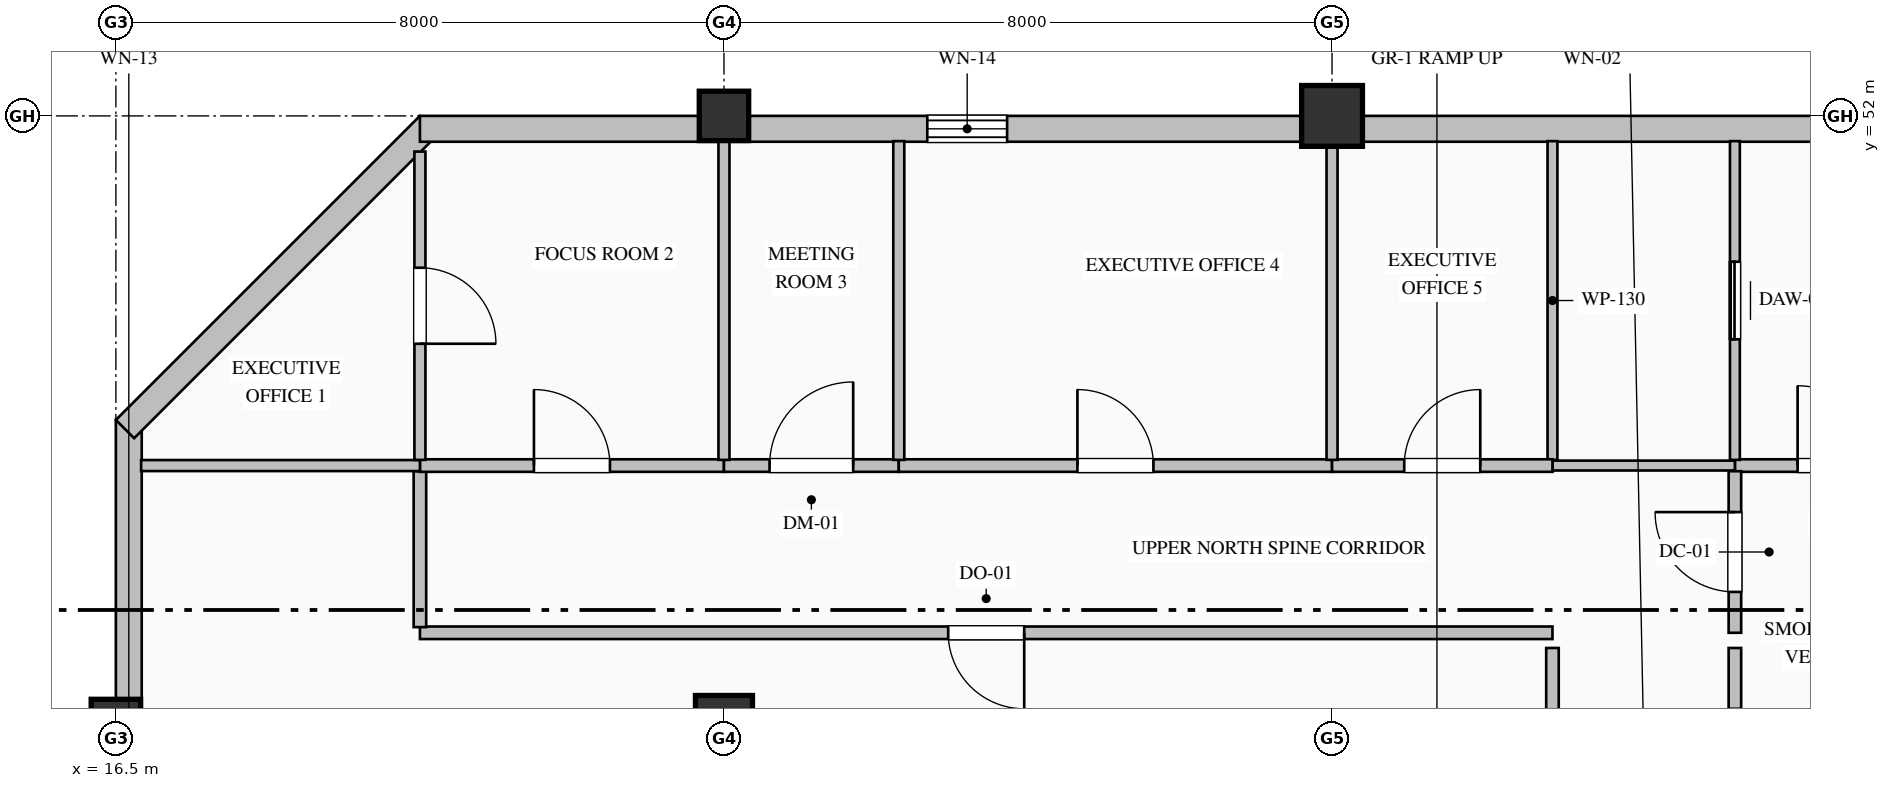
"""IFC4 building model, lengths in metres.
Left out: names, types, materials, properties, quantities, classifications, styles, units other than length and angle.
Written with IfcOpenShell. Run it as: python <this file> out.ifc"""

import sys

from ifc_helpers import new_model, si_unit, direction, frame, frame_2d, origin, origin_2d, place, context, subcontext, project, spatial, rectangle, hollow_rectangle, extrude, element, fill, save


model = new_model("IFC4")
c1 = context("Model", 3, precision=1e-05, world=origin(), true_north=direction((0.0, 1.0)))
c2 = subcontext(c1, "Body", "Model", "MODEL_VIEW")
j1 = project(units=[si_unit("LENGTHUNIT", "METRE"), si_unit("PLANEANGLEUNIT", "RADIAN")], contexts=[c1])
p1 = place(None, origin())
s1 = spatial("IfcSite", under=j1, at=p1, CompositionType="ELEMENT")
p2 = place(p1, origin())
s2 = spatial("IfcBuilding", under=s1, at=p2, CompositionType="ELEMENT")
p3 = place(p2, frame((0.0, 0.0, 291.2)))
s3 = spatial("IfcBuildingStorey", under=s2, at=p3, CompositionType="ELEMENT", Elevation=291.2)
p4 = place(p3, frame((16.5, 44.0, 0.0), z_axis=(0.0, 0.0, 1.0), x_axis=(1.0, 0.0, 0.0)))
e1 = element("IfcColumn", 1, at=p4, inside=s3, PredefinedType="COLUMN", context=c2, shape_type="SweptSolid", body=[
    extrude(hollow_rectangle(XDim=0.65, YDim=0.65, WallThickness=0.028, at=origin_2d()), origin(), (0.0, 0.0, 1.0), 4.0),
])
p5 = place(p3, frame((24.5, 44.0, 0.0), z_axis=(0.0, 0.0, 1.0), x_axis=(1.0, 0.0, 0.0)))
e2 = element("IfcColumn", 2, at=p5, inside=s3, PredefinedType="COLUMN", context=c2, shape_type="SweptSolid", body=[
    extrude(rectangle(XDim=0.75, YDim=0.75, at=origin_2d()), origin(), (0.0, 0.0, 1.0), 4.0),
])
p6 = place(p3, frame((24.5, 52.0, 0.0), z_axis=(0.0, 0.0, 1.0), x_axis=(1.0, 0.0, 0.0)))
e3 = element("IfcColumn", 3, at=p6, inside=s3, PredefinedType="COLUMN", context=c2, shape_type="SweptSolid", body=[
    extrude(hollow_rectangle(XDim=0.65, YDim=0.65, WallThickness=0.028, at=origin_2d()), origin(), (0.0, 0.0, 1.0), 4.0),
])
p7 = place(p3, frame((32.5, 52.0, 0.0), z_axis=(0.0, 0.0, 1.0), x_axis=(1.0, 0.0, 0.0)))
e4 = element("IfcColumn", 4, at=p7, inside=s3, PredefinedType="COLUMN", context=c2, shape_type="SweptSolid", body=[
    extrude(hollow_rectangle(XDim=0.8, YDim=0.8, WallThickness=0.032, at=origin_2d()), origin(), (0.0, 0.0, 1.0), 4.0),
])
p8 = place(p3, frame((16.67, 32.0, 0.0), z_axis=(0.0, 0.0, 1.0), x_axis=(0.0, 1.0, 0.0)))
e5 = element("IfcWall", 5, at=p8, inside=s3, PredefinedType="SOLIDWALL", context=c2, shape_type="SweptSolid", body=[
    extrude(rectangle(XDim=16.0, YDim=0.34, at=frame_2d((8.0, 0.0))), origin(), (0.0, 0.0, 1.0), 3.335),
])
p9 = place(p8, frame((6.525, 0.0, 0.9)))
e6 = element("IfcOpeningElement", 6, at=p9, cuts=e5, PredefinedType="OPENING", context=c2, shape_type="SweptSolid", body=[
    extrude(rectangle(XDim=1.35, YDim=1.85, at=frame_2d((0.675, 0.925))), frame((0.0, 0.18, 0.0), z_axis=(0.0, -1.0, 0.0), x_axis=(1.0, 0.0, 0.0)), (0.0, 0.0, 1.0), 0.36),
])
p10 = place(p8, frame((10.325, 0.0, 0.9)))
e7 = element("IfcOpeningElement", 7, at=p10, cuts=e5, PredefinedType="OPENING", context=c2, shape_type="SweptSolid", body=[
    extrude(rectangle(XDim=0.95, YDim=1.85, at=frame_2d((0.475, 0.925))), frame((0.0, 0.18, 0.0), z_axis=(0.0, -1.0, 0.0), x_axis=(1.0, 0.0, 0.0)), (0.0, 0.0, 1.0), 0.36),
])
p11 = place(p3, frame((16.62, 47.88, 0.0), z_axis=(0.0, 0.0, 1.0), x_axis=(0.707106781187, 0.707106781187, 0.0)))
e8 = element("IfcWall", 8, at=p11, inside=s3, PredefinedType="SOLIDWALL", context=c2, shape_type="SweptSolid", body=[
    extrude(rectangle(XDim=5.657, YDim=0.34, at=frame_2d((2.828, 0.0))), origin(), (0.0, 0.0, 1.0), 3.785),
])
p12 = place(p3, frame((20.5, 51.83, 0.0), z_axis=(0.0, 0.0, 1.0), x_axis=(1.0, 0.0, 0.0)))
e9 = element("IfcWall", 9, at=p12, inside=s3, PredefinedType="SOLIDWALL", context=c2, shape_type="SweptSolid", body=[
    extrude(rectangle(XDim=20.02, YDim=0.34, at=frame_2d((10.01, 0.0))), origin(), (0.0, 0.0, 1.0), 3.335),
])
p13 = place(p12, frame((6.675, 0.0, 0.8)))
e10 = element("IfcOpeningElement", 10, at=p13, cuts=e9, PredefinedType="OPENING", context=c2, shape_type="SweptSolid", body=[
    extrude(rectangle(XDim=1.05, YDim=2.15, at=frame_2d((0.525, 1.075))), frame((0.0, 0.18, 0.0), z_axis=(0.0, -1.0, 0.0), x_axis=(1.0, 0.0, 0.0)), (0.0, 0.0, 1.0), 0.36),
])
p14 = place(p3, frame((37.8, 47.4, 0.0), z_axis=(0.0, 0.0, 1.0), x_axis=(1.0, 0.0, 0.0)))
e11 = element("IfcWall", 11, at=p14, inside=s3, PredefinedType="PARTITIONING", context=c2, shape_type="SweptSolid", body=[
    extrude(rectangle(XDim=2.7, YDim=0.165, at=frame_2d((1.35, 0.0))), origin(), (0.0, 0.0, 1.0), 3.785),
])
p15 = place(p14, frame((0.825, 0.0, 0.0)))
e12 = element("IfcOpeningElement", 12, at=p15, cuts=e11, PredefinedType="OPENING", context=c2, shape_type="SweptSolid", body=[
    extrude(rectangle(XDim=1.05, YDim=2.15, at=frame_2d((0.525, 1.075))), frame((0.0, 0.093, 0.0), z_axis=(0.0, -1.0, 0.0), x_axis=(1.0, 0.0, 0.0)), (0.0, 0.0, 1.0), 0.185),
])
p16 = place(p3, frame((37.8, 45.2, 0.0), z_axis=(0.0, 0.0, 1.0), x_axis=(0.0, 1.0, 0.0)))
e13 = element("IfcWall", 13, at=p16, inside=s3, PredefinedType="PARTITIONING", context=c2, shape_type="SweptSolid", body=[
    extrude(rectangle(XDim=2.125, YDim=0.165, at=frame_2d((1.063, 0.0))), origin(), (0.0, 0.0, 1.0), 3.785),
])
p17 = place(p16, frame((0.538, 0.0, 0.0)))
e14 = element("IfcOpeningElement", 14, at=p17, cuts=e13, PredefinedType="OPENING", context=c2, shape_type="SweptSolid", body=[
    extrude(rectangle(XDim=1.05, YDim=2.15, at=frame_2d((0.525, 1.075))), frame((0.0, 0.093, 0.0), z_axis=(0.0, -1.0, 0.0), x_axis=(1.0, 0.0, 0.0)), (0.0, 0.0, 1.0), 0.185),
])
p18 = place(p3, frame((37.8, 44.2, 0.0), z_axis=(0.0, 0.0, 1.0), x_axis=(0.0, 1.0, 0.0)))
e15 = element("IfcWall", 15, at=p18, inside=s3, PredefinedType="PARTITIONING", context=c2, shape_type="SweptSolid", body=[
    extrude(rectangle(XDim=0.8, YDim=0.165, at=frame_2d((0.4, 0.0))), origin(), (0.0, 0.0, 1.0), 3.785),
])
p19 = place(p3, frame((37.8, 47.475, 0.0), z_axis=(0.0, 0.0, 1.0), x_axis=(0.0, 1.0, 0.0)))
e16 = element("IfcWall", 16, at=p19, inside=s3, PredefinedType="PARTITIONING", context=c2, shape_type="SweptSolid", body=[
    extrude(rectangle(XDim=4.193, YDim=0.13, at=frame_2d((2.097, 0.0))), origin(), (0.0, 0.0, 1.0), 3.785),
])
p20 = place(p19, frame((1.587, 0.0, 0.0)))
e17 = element("IfcOpeningElement", 17, at=p20, cuts=e16, PredefinedType="OPENING", context=c2, shape_type="SweptSolid", body=[
    extrude(rectangle(XDim=1.02, YDim=2.15, at=frame_2d((0.51, 1.075))), frame((0.0, 0.075, 0.0), z_axis=(0.0, -1.0, 0.0), x_axis=(1.0, 0.0, 0.0)), (0.0, 0.0, 1.0), 0.15),
])
p21 = place(p3, frame((37.8, 47.4, 0.0), z_axis=(0.0, 0.0, 1.0), x_axis=(-1.0, 0.0, 0.0)))
e18 = element("IfcWall", 18, at=p21, inside=s3, PredefinedType="PARTITIONING", context=c2, shape_type="SweptSolid", body=[
    extrude(rectangle(XDim=2.4, YDim=0.13, at=frame_2d((1.2, 0.0))), origin(), (0.0, 0.0, 1.0), 3.785),
])
p22 = place(p3, frame((35.4, 47.475, 0.0), z_axis=(0.0, 0.0, 1.0), x_axis=(0.0, 1.0, 0.0)))
e19 = element("IfcWall", 19, at=p22, inside=s3, PredefinedType="PARTITIONING", context=c2, shape_type="SweptSolid", body=[
    extrude(rectangle(XDim=4.193, YDim=0.13, at=frame_2d((2.097, 0.0))), origin(), (0.0, 0.0, 1.0), 3.785),
])
p23 = place(p3, frame((35.4, 45.2, 0.0), z_axis=(0.0, 0.0, 1.0), x_axis=(-1.0, 0.0, 0.0)))
e20 = element("IfcWall", 20, at=p23, inside=s3, PredefinedType="PARTITIONING", context=c2, shape_type="SweptSolid", body=[
    extrude(rectangle(XDim=14.9, YDim=0.165, at=frame_2d((7.45, 0.0))), origin(), (0.0, 0.0, 1.0), 3.785),
])
p24 = place(p23, frame((6.95, 0.0, 0.0)))
e21 = element("IfcOpeningElement", 21, at=p24, cuts=e20, PredefinedType="OPENING", context=c2, shape_type="SweptSolid", body=[
    extrude(rectangle(XDim=1.0, YDim=2.15, at=frame_2d((0.5, 1.075))), frame((0.0, 0.093, 0.0), z_axis=(0.0, -1.0, 0.0), x_axis=(1.0, 0.0, 0.0)), (0.0, 0.0, 1.0), 0.185),
])
p25 = place(p3, frame((20.5, 45.274, 0.0), z_axis=(0.0, 0.0, 1.0), x_axis=(0.0, 1.0, 0.0)))
e22 = element("IfcWall", 22, at=p25, inside=s3, PredefinedType="PARTITIONING", context=c2, shape_type="SweptSolid", body=[
    extrude(rectangle(XDim=2.051, YDim=0.165, at=frame_2d((1.025, 0.0))), origin(), (0.0, 0.0, 1.0), 3.785),
])
p26 = place(p3, frame((20.5, 47.4, 0.0), z_axis=(0.0, 0.0, 1.0), x_axis=(1.0, 0.0, 0.0)))
e23 = element("IfcWall", 23, at=p26, inside=s3, PredefinedType="PARTITIONING", context=c2, shape_type="SweptSolid", body=[
    extrude(rectangle(XDim=4.0, YDim=0.165, at=frame_2d((2.0, 0.0))), origin(), (0.0, 0.0, 1.0), 3.785),
])
p27 = place(p26, frame((1.5, 0.0, 0.0)))
e24 = element("IfcOpeningElement", 24, at=p27, cuts=e23, PredefinedType="OPENING", context=c2, shape_type="SweptSolid", body=[
    extrude(rectangle(XDim=1.0, YDim=2.15, at=frame_2d((0.5, 1.075))), frame((0.0, 0.093, 0.0), z_axis=(0.0, -1.0, 0.0), x_axis=(1.0, 0.0, 0.0)), (0.0, 0.0, 1.0), 0.185),
])
p28 = place(p3, frame((24.5, 47.4, 0.0), z_axis=(0.0, 0.0, 1.0), x_axis=(1.0, 0.0, 0.0)))
e25 = element("IfcWall", 25, at=p28, inside=s3, PredefinedType="PARTITIONING", context=c2, shape_type="SweptSolid", body=[
    extrude(rectangle(XDim=2.3, YDim=0.165, at=frame_2d((1.15, 0.0))), origin(), (0.0, 0.0, 1.0), 3.785),
])
p29 = place(p28, frame((0.6, 0.0, 0.0)))
e26 = element("IfcOpeningElement", 26, at=p29, cuts=e25, PredefinedType="OPENING", context=c2, shape_type="SweptSolid", body=[
    extrude(rectangle(XDim=1.1, YDim=2.2, at=frame_2d((0.55, 1.1))), frame((0.0, 0.093, 0.0), z_axis=(0.0, -1.0, 0.0), x_axis=(1.0, 0.0, 0.0)), (0.0, 0.0, 1.0), 0.185),
])
p30 = place(p3, frame((26.8, 47.4, 0.0), z_axis=(0.0, 0.0, 1.0), x_axis=(1.0, 0.0, 0.0)))
e27 = element("IfcWall", 27, at=p30, inside=s3, PredefinedType="PARTITIONING", context=c2, shape_type="SweptSolid", body=[
    extrude(rectangle(XDim=5.7, YDim=0.165, at=frame_2d((2.85, 0.0))), origin(), (0.0, 0.0, 1.0), 3.785),
])
p31 = place(p30, frame((2.35, 0.0, 0.0)))
e28 = element("IfcOpeningElement", 28, at=p31, cuts=e27, PredefinedType="OPENING", context=c2, shape_type="SweptSolid", body=[
    extrude(rectangle(XDim=1.0, YDim=2.15, at=frame_2d((0.5, 1.075))), frame((0.0, 0.093, 0.0), z_axis=(0.0, -1.0, 0.0), x_axis=(1.0, 0.0, 0.0)), (0.0, 0.0, 1.0), 0.185),
])
p32 = place(p3, frame((32.5, 47.4, 0.0), z_axis=(0.0, 0.0, 1.0), x_axis=(1.0, 0.0, 0.0)))
e29 = element("IfcWall", 29, at=p32, inside=s3, PredefinedType="PARTITIONING", context=c2, shape_type="SweptSolid", body=[
    extrude(rectangle(XDim=2.9, YDim=0.165, at=frame_2d((1.45, 0.0))), origin(), (0.0, 0.0, 1.0), 3.785),
])
p33 = place(p32, frame((0.95, 0.0, 0.0)))
e30 = element("IfcOpeningElement", 30, at=p33, cuts=e29, PredefinedType="OPENING", context=c2, shape_type="SweptSolid", body=[
    extrude(rectangle(XDim=1.0, YDim=2.15, at=frame_2d((0.5, 1.075))), frame((0.0, 0.093, 0.0), z_axis=(0.0, -1.0, 0.0), x_axis=(1.0, 0.0, 0.0)), (0.0, 0.0, 1.0), 0.185),
])
p34 = place(p3, frame((35.4, 33.6, 0.0), z_axis=(0.0, 0.0, 1.0), x_axis=(0.0, 1.0, 0.0)))
e31 = element("IfcWall", 31, at=p34, inside=s3, PredefinedType="PARTITIONING", context=c2, shape_type="SweptSolid", body=[
    extrude(rectangle(XDim=11.4, YDim=0.165, at=frame_2d((5.7, 0.0))), origin(), (0.0, 0.0, 1.0), 3.785),
])
p35 = place(p3, frame((16.832, 47.4, 0.0), z_axis=(0.0, 0.0, 1.0), x_axis=(1.0, 0.0, 0.0)))
e32 = element("IfcWall", 32, at=p35, inside=s3, PredefinedType="PARTITIONING", context=c2, shape_type="SweptSolid", body=[
    extrude(rectangle(XDim=3.668, YDim=0.145, at=frame_2d((1.834, 0.0))), origin(), (0.0, 0.0, 1.0), 3.785),
])
p36 = place(p3, frame((20.5, 51.531, 0.0), z_axis=(0.0, 0.0, 1.0), x_axis=(0.0, -1.0, 0.0)))
e33 = element("IfcWall", 33, at=p36, inside=s3, PredefinedType="PARTITIONING", context=c2, shape_type="SweptSolid", body=[
    extrude(rectangle(XDim=4.056, YDim=0.145, at=frame_2d((2.028, 0.0))), origin(), (0.0, 0.0, 1.0), 3.785),
])
p37 = place(p36, frame((1.528, 0.0, 0.0)))
e34 = element("IfcOpeningElement", 34, at=p37, cuts=e33, PredefinedType="OPENING", context=c2, shape_type="SweptSolid", body=[
    extrude(rectangle(XDim=1.0, YDim=2.15, at=frame_2d((0.5, 1.075))), frame((0.0, 0.083, 0.0), z_axis=(0.0, -1.0, 0.0), x_axis=(1.0, 0.0, 0.0)), (0.0, 0.0, 1.0), 0.165),
])
p38 = place(p3, frame((24.5, 51.668, 0.0), z_axis=(0.0, 0.0, 1.0), x_axis=(0.0, -1.0, 0.0)))
e35 = element("IfcWall", 35, at=p38, inside=s3, PredefinedType="PARTITIONING", context=c2, shape_type="SweptSolid", body=[
    extrude(rectangle(XDim=4.193, YDim=0.145, at=frame_2d((2.097, 0.0))), origin(), (0.0, 0.0, 1.0), 3.177),
])
for number, where, z_axis, x_axis in (
    (36, (26.8, 51.668, 0.0), (0.0, 0.0, 1.0), (0.0, -1.0, 0.0)),
    (37, (32.5, 51.668, 0.0), (0.0, 0.0, 1.0), (0.0, -1.0, 0.0)),
):
    element("IfcWall", number, at=place(p3, frame(where, z_axis=z_axis, x_axis=x_axis)), inside=s3, PredefinedType="PARTITIONING", context=c2, shape_type="SweptSolid", body=[
        extrude(rectangle(XDim=4.193, YDim=0.145, at=frame_2d((2.097, 0.0))), origin(), (0.0, 0.0, 1.0), 3.785),
    ])
p39 = place(p13, origin())
e38 = element("IfcWindow", 38, at=p39, inside=s3, PartitioningType="SINGLE_PANEL", PredefinedType="WINDOW", context=c2, shape_type="SweptSolid", body=[
    extrude(rectangle(XDim=1.05, YDim=2.15, at=frame_2d((0.525, 1.075))), frame((0.0, 0.15, 0.0), z_axis=(0.0, -1.0, 0.0), x_axis=(1.0, 0.0, 0.0)), (0.0, 0.0, 1.0), 0.06),
])
fill(e10, e38)
p40 = place(p15, origin())
e39 = element("IfcDoor", 39, at=p40, inside=s3, OperationType="SINGLE_SWING_LEFT", PredefinedType="DOOR", context=c2, shape_type="SweptSolid", body=[
    extrude(rectangle(XDim=1.05, YDim=2.15, at=frame_2d((0.525, 1.075))), frame((0.0, 0.025, 0.0), z_axis=(0.0, -1.0, 0.0), x_axis=(1.0, 0.0, 0.0)), (0.0, 0.0, 1.0), 0.05),
])
fill(e12, e39)
p41 = place(p17, origin())
e40 = element("IfcDoor", 40, at=p41, inside=s3, OperationType="SINGLE_SWING_RIGHT", PredefinedType="DOOR", context=c2, shape_type="SweptSolid", body=[
    extrude(rectangle(XDim=1.05, YDim=2.15, at=frame_2d((0.525, 1.075))), frame((0.0, 0.025, 0.0), z_axis=(0.0, -1.0, 0.0), x_axis=(1.0, 0.0, 0.0)), (0.0, 0.0, 1.0), 0.05),
])
fill(e14, e40)
p42 = place(p20, origin())
e41 = element("IfcDoor", 41, at=p42, inside=s3, OperationType="SLIDING_TO_LEFT", PredefinedType="DOOR", context=c2, shape_type="SweptSolid", body=[
    extrude(rectangle(XDim=1.02, YDim=2.15, at=frame_2d((0.51, 1.075))), frame((0.0, 0.025, 0.0), z_axis=(0.0, -1.0, 0.0), x_axis=(1.0, 0.0, 0.0)), (0.0, 0.0, 1.0), 0.05),
])
fill(e17, e41)
p43 = place(p24, origin())
e42 = element("IfcDoor", 42, at=p43, inside=s3, OperationType="SINGLE_SWING_LEFT", PredefinedType="DOOR", context=c2, shape_type="SweptSolid", body=[
    extrude(rectangle(XDim=1.0, YDim=2.15, at=frame_2d((0.5, 1.075))), frame((0.0, 0.025, 0.0), z_axis=(0.0, -1.0, 0.0), x_axis=(1.0, 0.0, 0.0)), (0.0, 0.0, 1.0), 0.05),
])
fill(e21, e42)
p44 = place(p37, origin())
e43 = element("IfcDoor", 43, at=p44, inside=s3, OperationType="SINGLE_SWING_RIGHT", PredefinedType="DOOR", context=c2, shape_type="SweptSolid", body=[
    extrude(rectangle(XDim=1.0, YDim=2.15, at=frame_2d((0.5, 1.075))), frame((0.0, 0.025, 0.0), z_axis=(0.0, -1.0, 0.0), x_axis=(1.0, 0.0, 0.0)), (0.0, 0.0, 1.0), 0.05),
])
fill(e34, e43)
p45 = place(p27, origin())
e44 = element("IfcDoor", 44, at=p45, inside=s3, OperationType="SINGLE_SWING_LEFT", PredefinedType="DOOR", context=c2, shape_type="SweptSolid", body=[
    extrude(rectangle(XDim=1.0, YDim=2.15, at=frame_2d((0.5, 1.075))), frame((0.0, 0.025, 0.0), z_axis=(0.0, -1.0, 0.0), x_axis=(1.0, 0.0, 0.0)), (0.0, 0.0, 1.0), 0.05),
])
fill(e24, e44)
p46 = place(p29, origin())
e45 = element("IfcDoor", 45, at=p46, inside=s3, OperationType="SINGLE_SWING_RIGHT", PredefinedType="DOOR", context=c2, shape_type="SweptSolid", body=[
    extrude(rectangle(XDim=1.1, YDim=2.2, at=frame_2d((0.55, 1.1))), frame((0.0, 0.025, 0.0), z_axis=(0.0, -1.0, 0.0), x_axis=(1.0, 0.0, 0.0)), (0.0, 0.0, 1.0), 0.05),
])
fill(e26, e45)
p47 = place(p31, origin())
e46 = element("IfcDoor", 46, at=p47, inside=s3, OperationType="SINGLE_SWING_LEFT", PredefinedType="DOOR", context=c2, shape_type="SweptSolid", body=[
    extrude(rectangle(XDim=1.0, YDim=2.15, at=frame_2d((0.5, 1.075))), frame((0.0, 0.025, 0.0), z_axis=(0.0, -1.0, 0.0), x_axis=(1.0, 0.0, 0.0)), (0.0, 0.0, 1.0), 0.05),
])
fill(e28, e46)
p48 = place(p33, origin())
e47 = element("IfcDoor", 47, at=p48, inside=s3, OperationType="SINGLE_SWING_RIGHT", PredefinedType="DOOR", context=c2, shape_type="SweptSolid", body=[
    extrude(rectangle(XDim=1.0, YDim=2.15, at=frame_2d((0.5, 1.075))), frame((0.0, 0.025, 0.0), z_axis=(0.0, -1.0, 0.0), x_axis=(1.0, 0.0, 0.0)), (0.0, 0.0, 1.0), 0.05),
])
fill(e30, e47)
save(model, sys.argv[1])
